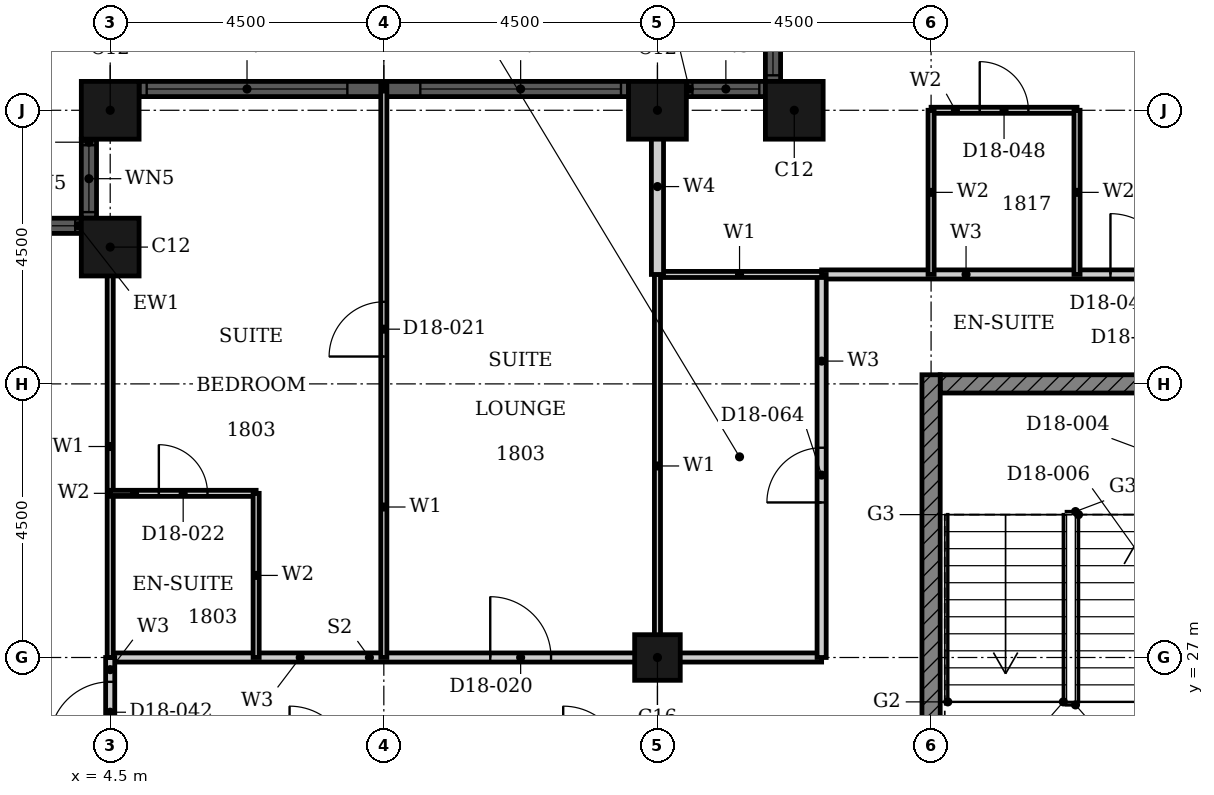
"""IFC4 building model, lengths in metres.
Left out: names, types, materials, properties, quantities, classifications, styles, units other than length and angle.
Written with IfcOpenShell. Run it as: python <this file> out.ifc"""

import sys

from ifc_helpers import new_model, si_unit, direction, frame, frame_2d, origin, origin_2d, place, context, subcontext, project, spatial, rectangle, hollow_rectangle, extrude, element, fill, save


model = new_model("IFC4")
c1 = context("Model", 3, precision=1e-05, world=origin(), true_north=direction((0.0, 1.0)))
c2 = subcontext(c1, "Body", "Model", "MODEL_VIEW")
j1 = project(units=[si_unit("LENGTHUNIT", "METRE"), si_unit("PLANEANGLEUNIT", "RADIAN")], contexts=[c1])
p1 = place(None, origin())
s1 = spatial("IfcSite", under=j1, at=p1, CompositionType="ELEMENT")
p2 = place(p1, origin())
s2 = spatial("IfcBuilding", under=s1, at=p2, CompositionType="ELEMENT")
p3 = place(p2, frame((0.0, 0.0, 78.0)))
s3 = spatial("IfcBuildingStorey", under=s2, at=p3, CompositionType="ELEMENT", Elevation=78.0)
for number, where, z_axis, x_axis in (
    (1, (15.75, 36.0, 0.0), (0.0, 0.0, 1.0), (1.0, 0.0, 0.0)),
    (2, (13.5, 36.0, 0.0), (0.0, 0.0, 1.0), (1.0, 0.0, 0.0)),
    (3, (4.5, 36.0, 0.0), (0.0, 0.0, 1.0), (1.0, 0.0, 0.0)),
    (4, (4.5, 33.75, 0.0), (0.0, 0.0, 1.0), (1.0, 0.0, 0.0)),
):
    element("IfcColumn", number, at=place(p3, frame(where, z_axis=z_axis, x_axis=x_axis)), inside=s3, PredefinedType="COLUMN", context=c2, shape_type="SweptSolid", body=[
        extrude(hollow_rectangle(XDim=0.95, YDim=0.95, WallThickness=0.03, at=origin_2d()), origin(), (0.0, 0.0, 1.0), 3.6),
    ])
p4 = place(p3, frame((13.5, 27.0, 0.0), z_axis=(0.0, 0.0, 1.0), x_axis=(1.0, 0.0, 0.0)))
e5 = element("IfcColumn", 5, at=p4, inside=s3, PredefinedType="COLUMN", context=c2, shape_type="SweptSolid", body=[
    extrude(hollow_rectangle(XDim=0.75, YDim=0.75, WallThickness=0.024, at=origin_2d()), origin(), (0.0, 0.0, 1.0), 3.6),
])
p5 = place(p3, frame((15.4, 37.775, 0.0), z_axis=(0.0, 0.0, 1.0), x_axis=(0.0, -1.0, 0.0)))
e6 = element("IfcWall", 6, at=p5, inside=s3, PredefinedType="SOLIDWALL", context=c2, shape_type="SweptSolid", body=[
    extrude(rectangle(XDim=1.3, YDim=0.25, at=frame_2d((0.65, 0.0))), origin(), (0.0, 0.0, 1.0), 3.6),
])
p6 = place(p5, frame((0.1, 0.0, 0.9)))
e7 = element("IfcOpeningElement", 7, at=p6, cuts=e6, PredefinedType="OPENING", context=c2, shape_type="SweptSolid", body=[
    extrude(rectangle(XDim=1.1, YDim=2.08, at=frame_2d((0.55, 1.04))), frame((0.0, 0.135, 0.0), z_axis=(0.0, -1.0, 0.0), x_axis=(1.0, 0.0, 0.0)), (0.0, 0.0, 1.0), 0.27),
])
p7 = place(p3, frame((15.275, 36.35, 0.0), z_axis=(0.0, 0.0, 1.0), x_axis=(-1.0, 0.0, 0.0)))
e8 = element("IfcWall", 8, at=p7, inside=s3, PredefinedType="SOLIDWALL", context=c2, shape_type="SweptSolid", body=[
    extrude(rectangle(XDim=1.3, YDim=0.25, at=frame_2d((0.65, 0.0))), origin(), (0.0, 0.0, 1.0), 3.6),
])
p8 = place(p7, frame((0.1, 0.0, 0.9)))
e9 = element("IfcOpeningElement", 9, at=p8, cuts=e8, PredefinedType="OPENING", context=c2, shape_type="SweptSolid", body=[
    extrude(rectangle(XDim=1.1, YDim=2.08, at=frame_2d((0.55, 1.04))), frame((0.0, 0.135, 0.0), z_axis=(0.0, -1.0, 0.0), x_axis=(1.0, 0.0, 0.0)), (0.0, 0.0, 1.0), 0.27),
])
p9 = place(p3, frame((13.025, 36.35, 0.0), z_axis=(0.0, 0.0, 1.0), x_axis=(-1.0, 0.0, 0.0)))
e10 = element("IfcWall", 10, at=p9, inside=s3, PredefinedType="SOLIDWALL", context=c2, shape_type="SweptSolid", body=[
    extrude(rectangle(XDim=8.05, YDim=0.25, at=frame_2d((4.025, 0.0))), origin(), (0.0, 0.0, 1.0), 3.6),
])
p10 = place(p9, frame((0.125, 0.0, 0.9)))
e11 = element("IfcOpeningElement", 11, at=p10, cuts=e10, PredefinedType="OPENING", context=c2, shape_type="SweptSolid", body=[
    extrude(rectangle(XDim=3.3, YDim=2.08, at=frame_2d((1.65, 1.04))), frame((0.0, 0.135, 0.0), z_axis=(0.0, -1.0, 0.0), x_axis=(1.0, 0.0, 0.0)), (0.0, 0.0, 1.0), 0.27),
])
p11 = place(p9, frame((4.625, 0.0, 0.9)))
e12 = element("IfcOpeningElement", 12, at=p11, cuts=e10, PredefinedType="OPENING", context=c2, shape_type="SweptSolid", body=[
    extrude(rectangle(XDim=3.3, YDim=2.08, at=frame_2d((1.65, 1.04))), frame((0.0, 0.135, 0.0), z_axis=(0.0, -1.0, 0.0), x_axis=(1.0, 0.0, 0.0)), (0.0, 0.0, 1.0), 0.27),
])
p12 = place(p3, frame((4.15, 35.525, 0.0), z_axis=(0.0, 0.0, 1.0), x_axis=(0.0, -1.0, 0.0)))
e13 = element("IfcWall", 13, at=p12, inside=s3, PredefinedType="SOLIDWALL", context=c2, shape_type="SweptSolid", body=[
    extrude(rectangle(XDim=1.3, YDim=0.25, at=frame_2d((0.65, 0.0))), origin(), (0.0, 0.0, 1.0), 3.6),
])
p13 = place(p12, frame((0.1, 0.0, 0.9)))
e14 = element("IfcOpeningElement", 14, at=p13, cuts=e13, PredefinedType="OPENING", context=c2, shape_type="SweptSolid", body=[
    extrude(rectangle(XDim=1.1, YDim=2.08, at=frame_2d((0.55, 1.04))), frame((0.0, 0.135, 0.0), z_axis=(0.0, -1.0, 0.0), x_axis=(1.0, 0.0, 0.0)), (0.0, 0.0, 1.0), 0.27),
])
p14 = place(p3, frame((4.025, 34.1, 0.0), z_axis=(0.0, 0.0, 1.0), x_axis=(-1.0, 0.0, 0.0)))
e15 = element("IfcWall", 15, at=p14, inside=s3, PredefinedType="SOLIDWALL", context=c2, shape_type="SweptSolid", body=[
    extrude(rectangle(XDim=1.3, YDim=0.25, at=frame_2d((0.65, 0.0))), origin(), (0.0, 0.0, 1.0), 3.6),
])
p15 = place(p14, frame((0.1, 0.0, 0.9)))
e16 = element("IfcOpeningElement", 16, at=p15, cuts=e15, PredefinedType="OPENING", context=c2, shape_type="SweptSolid", body=[
    extrude(rectangle(XDim=1.1, YDim=2.08, at=frame_2d((0.55, 1.04))), frame((0.0, 0.135, 0.0), z_axis=(0.0, -1.0, 0.0), x_axis=(1.0, 0.0, 0.0)), (0.0, 0.0, 1.0), 0.27),
])
p16 = place(p3, frame((18.15, 31.5, 0.0), z_axis=(0.0, 0.0, 1.0), x_axis=(1.0, 0.0, 0.0)))
e17 = element("IfcWall", 17, at=p16, inside=s3, PredefinedType="SHEAR", context=c2, shape_type="SweptSolid", body=[
    extrude(rectangle(XDim=6.797, YDim=0.3, at=frame_2d((3.398, 0.0))), origin(), (0.0, 0.0, 1.0), 3.3),
])
p17 = place(p16, frame((4.736, 0.0, 0.0)))
e18 = element("IfcOpeningElement", 18, at=p17, cuts=e17, PredefinedType="OPENING", context=c2, shape_type="SweptSolid", body=[
    extrude(rectangle(XDim=1.8, YDim=2.1, at=frame_2d((0.9, 1.05))), frame((0.0, 0.16, 0.0), z_axis=(0.0, -1.0, 0.0), x_axis=(1.0, 0.0, 0.0)), (0.0, 0.0, 1.0), 0.32),
])
p18 = place(p3, frame((18.0, 22.35, 0.0), z_axis=(0.0, 0.0, 1.0), x_axis=(0.0, 1.0, 0.0)))
e19 = element("IfcWall", 19, at=p18, inside=s3, PredefinedType="SHEAR", context=c2, shape_type="SweptSolid", body=[
    extrude(rectangle(XDim=9.3, YDim=0.3, at=frame_2d((4.65, 0.0))), origin(), (0.0, 0.0, 1.0), 3.3),
])
p19 = place(p3, frame((4.5, 27.0, 0.0), z_axis=(0.0, 0.0, 1.0), x_axis=(1.0, 0.0, 0.0)))
e20 = element("IfcWall", 20, at=p19, inside=s3, PredefinedType="PARTITIONING", context=c2, shape_type="SweptSolid", body=[
    extrude(rectangle(XDim=11.7, YDim=0.15, at=frame_2d((5.85, 0.0))), origin(), (0.0, 0.0, 1.0), 2.58),
])
p20 = place(p19, frame((6.25, 0.0, 0.0)))
e21 = element("IfcOpeningElement", 21, at=p20, cuts=e20, PredefinedType="OPENING", context=c2, shape_type="SweptSolid", body=[
    extrude(rectangle(XDim=1.0, YDim=2.1, at=frame_2d((0.5, 1.05))), frame((0.0, 0.085, 0.0), z_axis=(0.0, -1.0, 0.0), x_axis=(1.0, 0.0, 0.0)), (0.0, 0.0, 1.0), 0.17),
])
p21 = place(p3, frame((16.2, 33.3, 0.0), z_axis=(0.0, 0.0, 1.0), x_axis=(1.0, 0.0, 0.0)))
e22 = element("IfcWall", 22, at=p21, inside=s3, PredefinedType="PARTITIONING", context=c2, shape_type="SweptSolid", body=[
    extrude(rectangle(XDim=15.3, YDim=0.15, at=frame_2d((7.65, 0.0))), origin(), (0.0, 0.0, 1.0), 3.3),
])
p22 = place(p21, frame((4.75, 0.0, 0.0)))
e23 = element("IfcOpeningElement", 23, at=p22, cuts=e22, PredefinedType="OPENING", context=c2, shape_type="SweptSolid", body=[
    extrude(rectangle(XDim=1.0, YDim=2.1, at=frame_2d((0.5, 1.05))), frame((0.0, 0.085, 0.0), z_axis=(0.0, -1.0, 0.0), x_axis=(1.0, 0.0, 0.0)), (0.0, 0.0, 1.0), 0.17),
])
p23 = place(p21, frame((7.65, 0.0, 0.0)))
e24 = element("IfcOpeningElement", 24, at=p23, cuts=e22, PredefinedType="OPENING", context=c2, shape_type="SweptSolid", body=[
    extrude(rectangle(XDim=0.9, YDim=2.1, at=frame_2d((0.45, 1.05))), frame((0.0, 0.085, 0.0), z_axis=(0.0, -1.0, 0.0), x_axis=(1.0, 0.0, 0.0)), (0.0, 0.0, 1.0), 0.17),
])
p24 = place(p21, frame((12.15, 0.0, 0.0)))
e25 = element("IfcOpeningElement", 25, at=p24, cuts=e22, PredefinedType="OPENING", context=c2, shape_type="SweptSolid", body=[
    extrude(rectangle(XDim=0.9, YDim=2.1, at=frame_2d((0.45, 1.05))), frame((0.0, 0.085, 0.0), z_axis=(0.0, -1.0, 0.0), x_axis=(1.0, 0.0, 0.0)), (0.0, 0.0, 1.0), 0.17),
])
p25 = place(p3, frame((16.2, 27.0, 0.0), z_axis=(0.0, 0.0, 1.0), x_axis=(0.0, 1.0, 0.0)))
e26 = element("IfcWall", 26, at=p25, inside=s3, PredefinedType="PARTITIONING", context=c2, shape_type="SweptSolid", body=[
    extrude(rectangle(XDim=6.3, YDim=0.15, at=frame_2d((3.15, 0.0))), origin(), (0.0, 0.0, 1.0), 3.3),
])
p26 = place(p25, frame((2.55, 0.0, 0.0)))
e27 = element("IfcOpeningElement", 27, at=p26, cuts=e26, PredefinedType="OPENING", context=c2, shape_type="SweptSolid", body=[
    extrude(rectangle(XDim=0.9, YDim=2.1, at=frame_2d((0.45, 1.05))), frame((0.0, 0.085, 0.0), z_axis=(0.0, -1.0, 0.0), x_axis=(1.0, 0.0, 0.0)), (0.0, 0.0, 1.0), 0.17),
])
p27 = place(p3, frame((4.5, 25.2, 0.0), z_axis=(0.0, 0.0, 1.0), x_axis=(0.0, 1.0, 0.0)))
e28 = element("IfcWall", 28, at=p27, inside=s3, PredefinedType="PARTITIONING", context=c2, shape_type="SweptSolid", body=[
    extrude(rectangle(XDim=1.8, YDim=0.15, at=frame_2d((0.9, 0.0))), origin(), (0.0, 0.0, 1.0), 3.3),
])
p28 = place(p27, frame((0.4, 0.0, 0.0)))
e29 = element("IfcOpeningElement", 29, at=p28, cuts=e28, PredefinedType="OPENING", context=c2, shape_type="SweptSolid", body=[
    extrude(rectangle(XDim=1.0, YDim=2.1, at=frame_2d((0.5, 1.05))), frame((0.0, 0.085, 0.0), z_axis=(0.0, -1.0, 0.0), x_axis=(1.0, 0.0, 0.0)), (0.0, 0.0, 1.0), 0.17),
])
p29 = place(p3, frame((13.5, 33.3, 0.0), z_axis=(0.0, 0.0, 1.0), x_axis=(1.0, 0.0, 0.0)))
e30 = element("IfcWall", 30, at=p29, inside=s3, PredefinedType="PARTITIONING", context=c2, shape_type="SweptSolid", body=[
    extrude(rectangle(XDim=2.7, YDim=0.1, at=frame_2d((1.35, 0.0))), origin(), (0.0, 0.0, 1.0), 3.3),
])
p30 = place(p3, frame((13.5, 27.0, 0.0), z_axis=(0.0, 0.0, 1.0), x_axis=(0.0, 1.0, 0.0)))
e31 = element("IfcWall", 31, at=p30, inside=s3, PredefinedType="PARTITIONING", context=c2, shape_type="SweptSolid", body=[
    extrude(rectangle(XDim=6.3, YDim=0.1, at=frame_2d((3.15, 0.0))), origin(), (0.0, 0.0, 1.0), 2.38),
])
p31 = place(p3, frame((4.5, 27.0, 0.0), z_axis=(0.0, 0.0, 1.0), x_axis=(0.0, 1.0, 0.0)))
e32 = element("IfcWall", 32, at=p31, inside=s3, PredefinedType="PARTITIONING", context=c2, shape_type="SweptSolid", body=[
    extrude(rectangle(XDim=6.94, YDim=0.1, at=frame_2d((3.47, 0.0))), origin(), (0.0, 0.0, 1.0), 3.3),
])
p32 = place(p3, frame((9.0, 27.0, 0.0), z_axis=(0.0, 0.0, 1.0), x_axis=(0.0, 1.0, 0.0)))
e33 = element("IfcWall", 33, at=p32, inside=s3, PredefinedType="PARTITIONING", context=c2, shape_type="SweptSolid", body=[
    extrude(rectangle(XDim=9.415, YDim=0.1, at=frame_2d((4.708, 0.0))), origin(), (0.0, 0.0, 1.0), 3.3),
])
p33 = place(p32, frame((4.95, 0.0, 0.0)))
e34 = element("IfcOpeningElement", 34, at=p33, cuts=e33, PredefinedType="OPENING", context=c2, shape_type="SweptSolid", body=[
    extrude(rectangle(XDim=0.9, YDim=2.1, at=frame_2d((0.45, 1.05))), frame((0.0, 0.06, 0.0), z_axis=(0.0, -1.0, 0.0), x_axis=(1.0, 0.0, 0.0)), (0.0, 0.0, 1.0), 0.12),
])
p34 = place(p3, frame((13.5, 33.3, 0.0), z_axis=(0.0, 0.0, 1.0), x_axis=(0.0, 1.0, 0.0)))
e35 = element("IfcWall", 35, at=p34, inside=s3, PredefinedType="PARTITIONING", context=c2, shape_type="SweptSolid", body=[
    extrude(rectangle(XDim=2.89, YDim=0.2, at=frame_2d((1.445, 0.0))), origin(), (0.0, 0.0, 1.0), 2.38),
])
p35 = place(p3, frame((4.5, 29.7, 0.0), z_axis=(0.0, 0.0, 1.0), x_axis=(1.0, 0.0, 0.0)))
e36 = element("IfcWall", 36, at=p35, inside=s3, PredefinedType="PARTITIONING", context=c2, shape_type="SweptSolid", body=[
    extrude(rectangle(XDim=2.4, YDim=0.1, at=frame_2d((1.2, 0.0))), origin(), (0.0, 0.0, 1.0), 3.3),
])
p36 = place(p35, frame((0.8, 0.0, 0.0)))
e37 = element("IfcOpeningElement", 37, at=p36, cuts=e36, PredefinedType="OPENING", context=c2, shape_type="SweptSolid", body=[
    extrude(rectangle(XDim=0.8, YDim=2.1, at=frame_2d((0.4, 1.05))), frame((0.0, 0.06, 0.0), z_axis=(0.0, -1.0, 0.0), x_axis=(1.0, 0.0, 0.0)), (0.0, 0.0, 1.0), 0.12),
])
p37 = place(p3, frame((18.0, 36.0, 0.0), z_axis=(0.0, 0.0, 1.0), x_axis=(1.0, 0.0, 0.0)))
e38 = element("IfcWall", 38, at=p37, inside=s3, PredefinedType="PARTITIONING", context=c2, shape_type="SweptSolid", body=[
    extrude(rectangle(XDim=2.4, YDim=0.1, at=frame_2d((1.2, 0.0))), origin(), (0.0, 0.0, 1.0), 3.3),
])
p38 = place(p37, frame((0.8, 0.0, 0.0)))
e39 = element("IfcOpeningElement", 39, at=p38, cuts=e38, PredefinedType="OPENING", context=c2, shape_type="SweptSolid", body=[
    extrude(rectangle(XDim=0.8, YDim=2.1, at=frame_2d((0.4, 1.05))), frame((0.0, 0.06, 0.0), z_axis=(0.0, -1.0, 0.0), x_axis=(1.0, 0.0, 0.0)), (0.0, 0.0, 1.0), 0.12),
])
for number, where, z_axis, x_axis in (
    (40, (18.0, 33.3, 0.0), (0.0, 0.0, 1.0), (0.0, 1.0, 0.0)),
    (41, (20.4, 33.3, 0.0), (0.0, 0.0, 1.0), (0.0, 1.0, 0.0)),
    (42, (6.9, 27.0, 0.0), (0.0, 0.0, 1.0), (0.0, 1.0, 0.0)),
):
    element("IfcWall", number, at=place(p3, frame(where, z_axis=z_axis, x_axis=x_axis)), inside=s3, PredefinedType="PARTITIONING", context=c2, shape_type="SweptSolid", body=[
        extrude(rectangle(XDim=2.7, YDim=0.1, at=frame_2d((1.35, 0.0))), origin(), (0.0, 0.0, 1.0), 3.3),
    ])
p39 = place(p6, origin())
e43 = element("IfcWindow", 43, at=p39, inside=s3, PartitioningType="SINGLE_PANEL", PredefinedType="WINDOW", context=c2, shape_type="SweptSolid", body=[
    extrude(rectangle(XDim=1.1, YDim=2.08, at=frame_2d((0.55, 1.04))), frame((0.0, 0.03, 0.0), z_axis=(0.0, -1.0, 0.0), x_axis=(1.0, 0.0, 0.0)), (0.0, 0.0, 1.0), 0.06),
])
fill(e7, e43)
p40 = place(p8, origin())
e44 = element("IfcWindow", 44, at=p40, inside=s3, PartitioningType="SINGLE_PANEL", PredefinedType="WINDOW", context=c2, shape_type="SweptSolid", body=[
    extrude(rectangle(XDim=1.1, YDim=2.08, at=frame_2d((0.55, 1.04))), frame((0.0, 0.03, 0.0), z_axis=(0.0, -1.0, 0.0), x_axis=(1.0, 0.0, 0.0)), (0.0, 0.0, 1.0), 0.06),
])
fill(e9, e44)
p41 = place(p10, origin())
e45 = element("IfcWindow", 45, at=p41, inside=s3, PartitioningType="SINGLE_PANEL", PredefinedType="WINDOW", context=c2, shape_type="SweptSolid", body=[
    extrude(rectangle(XDim=3.3, YDim=2.08, at=frame_2d((1.65, 1.04))), frame((0.0, 0.03, 0.0), z_axis=(0.0, -1.0, 0.0), x_axis=(1.0, 0.0, 0.0)), (0.0, 0.0, 1.0), 0.06),
])
fill(e11, e45)
p42 = place(p11, origin())
e46 = element("IfcWindow", 46, at=p42, inside=s3, PartitioningType="SINGLE_PANEL", PredefinedType="WINDOW", context=c2, shape_type="SweptSolid", body=[
    extrude(rectangle(XDim=3.3, YDim=2.08, at=frame_2d((1.65, 1.04))), frame((0.0, 0.03, 0.0), z_axis=(0.0, -1.0, 0.0), x_axis=(1.0, 0.0, 0.0)), (0.0, 0.0, 1.0), 0.06),
])
fill(e12, e46)
p43 = place(p13, origin())
e47 = element("IfcWindow", 47, at=p43, inside=s3, PartitioningType="SINGLE_PANEL", PredefinedType="WINDOW", context=c2, shape_type="SweptSolid", body=[
    extrude(rectangle(XDim=1.1, YDim=2.08, at=frame_2d((0.55, 1.04))), frame((0.0, 0.03, 0.0), z_axis=(0.0, -1.0, 0.0), x_axis=(1.0, 0.0, 0.0)), (0.0, 0.0, 1.0), 0.06),
])
fill(e14, e47)
p44 = place(p15, origin())
e48 = element("IfcWindow", 48, at=p44, inside=s3, PartitioningType="SINGLE_PANEL", PredefinedType="WINDOW", context=c2, shape_type="SweptSolid", body=[
    extrude(rectangle(XDim=1.1, YDim=2.08, at=frame_2d((0.55, 1.04))), frame((0.0, 0.03, 0.0), z_axis=(0.0, -1.0, 0.0), x_axis=(1.0, 0.0, 0.0)), (0.0, 0.0, 1.0), 0.06),
])
fill(e16, e48)
p45 = place(p20, origin())
e49 = element("IfcDoor", 49, at=p45, inside=s3, OperationType="SINGLE_SWING_LEFT", PredefinedType="DOOR", context=c2, shape_type="SweptSolid", body=[
    extrude(rectangle(XDim=1.0, YDim=2.1, at=frame_2d((0.5, 1.05))), frame((0.0, 0.025, 0.0), z_axis=(0.0, -1.0, 0.0), x_axis=(1.0, 0.0, 0.0)), (0.0, 0.0, 1.0), 0.05),
])
fill(e21, e49)
p46 = place(p33, origin())
e50 = element("IfcDoor", 50, at=p46, inside=s3, OperationType="SINGLE_SWING_RIGHT", PredefinedType="DOOR", context=c2, shape_type="SweptSolid", body=[
    extrude(rectangle(XDim=0.9, YDim=2.1, at=frame_2d((0.45, 1.05))), frame((0.0, 0.025, 0.0), z_axis=(0.0, -1.0, 0.0), x_axis=(1.0, 0.0, 0.0)), (0.0, 0.0, 1.0), 0.05),
])
fill(e34, e50)
p47 = place(p36, origin())
e51 = element("IfcDoor", 51, at=p47, inside=s3, OperationType="SINGLE_SWING_LEFT", PredefinedType="DOOR", context=c2, shape_type="SweptSolid", body=[
    extrude(rectangle(XDim=0.8, YDim=2.1, at=frame_2d((0.4, 1.05))), frame((0.0, 0.025, 0.0), z_axis=(0.0, -1.0, 0.0), x_axis=(1.0, 0.0, 0.0)), (0.0, 0.0, 1.0), 0.05),
])
fill(e37, e51)
p48 = place(p28, origin())
e52 = element("IfcDoor", 52, at=p48, inside=s3, OperationType="SINGLE_SWING_LEFT", PredefinedType="DOOR", context=c2, shape_type="SweptSolid", body=[
    extrude(rectangle(XDim=1.0, YDim=2.1, at=frame_2d((0.5, 1.05))), frame((0.0, 0.025, 0.0), z_axis=(0.0, -1.0, 0.0), x_axis=(1.0, 0.0, 0.0)), (0.0, 0.0, 1.0), 0.05),
])
fill(e29, e52)
p49 = place(p22, origin())
e53 = element("IfcDoor", 53, at=p49, inside=s3, OperationType="SINGLE_SWING_RIGHT", PredefinedType="DOOR", context=c2, shape_type="SweptSolid", body=[
    extrude(rectangle(XDim=1.0, YDim=2.1, at=frame_2d((0.5, 1.05))), frame((0.0, 0.025, 0.0), z_axis=(0.0, -1.0, 0.0), x_axis=(1.0, 0.0, 0.0)), (0.0, 0.0, 1.0), 0.05),
])
fill(e23, e53)
p50 = place(p38, origin())
e54 = element("IfcDoor", 54, at=p50, inside=s3, OperationType="SINGLE_SWING_RIGHT", PredefinedType="DOOR", context=c2, shape_type="SweptSolid", body=[
    extrude(rectangle(XDim=0.8, YDim=2.1, at=frame_2d((0.4, 1.05))), frame((0.0, 0.025, 0.0), z_axis=(0.0, -1.0, 0.0), x_axis=(1.0, 0.0, 0.0)), (0.0, 0.0, 1.0), 0.05),
])
fill(e39, e54)
p51 = place(p26, origin())
e55 = element("IfcDoor", 55, at=p51, inside=s3, OperationType="SINGLE_SWING_LEFT", PredefinedType="DOOR", context=c2, shape_type="SweptSolid", body=[
    extrude(rectangle(XDim=0.9, YDim=2.1, at=frame_2d((0.45, 1.05))), frame((0.0, 0.025, 0.0), z_axis=(0.0, -1.0, 0.0), x_axis=(1.0, 0.0, 0.0)), (0.0, 0.0, 1.0), 0.05),
])
fill(e27, e55)
save(model, sys.argv[1])
